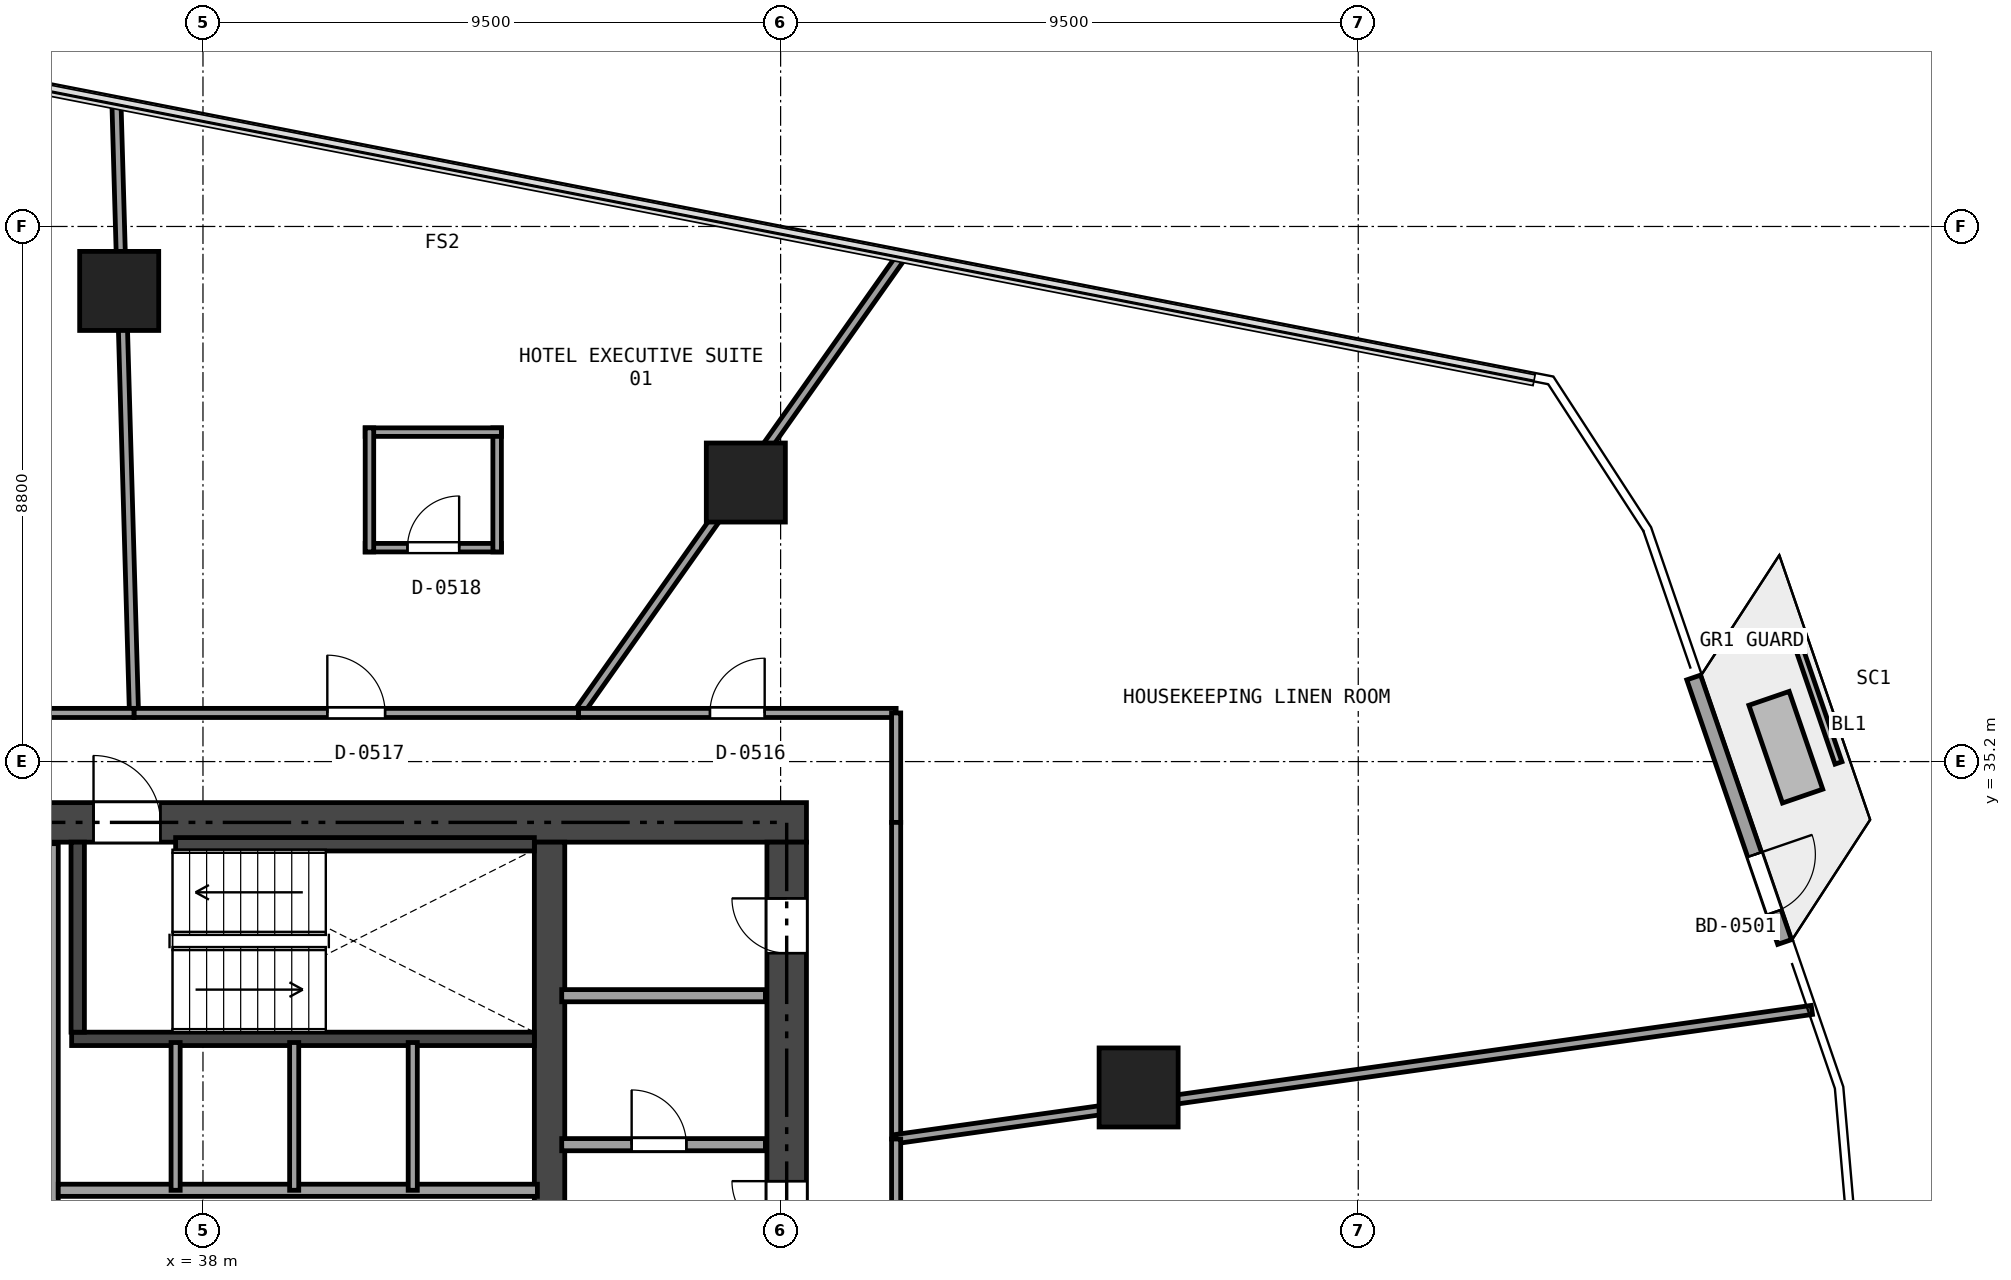
"""IFC4 building model, lengths in metres.
Left out: names, types, materials, properties, quantities, classifications, styles, units other than length and angle.
Written with IfcOpenShell. Run it as: python <this file> out.ifc"""

import sys

from ifc_helpers import new_model, si_unit, direction, frame, frame_2d, origin, origin_2d, place, context, subcontext, project, spatial, rectangle, extrude, element, fill, save


model = new_model("IFC4")
c1 = context("Model", 3, precision=1e-05, world=origin(), true_north=direction((0.0, 1.0)))
c2 = subcontext(c1, "Body", "Model", "MODEL_VIEW")
j1 = project(units=[si_unit("LENGTHUNIT", "METRE"), si_unit("PLANEANGLEUNIT", "RADIAN")], contexts=[c1])
p1 = place(None, origin())
s1 = spatial("IfcSite", under=j1, at=p1, CompositionType="ELEMENT")
p2 = place(p1, origin())
s2 = spatial("IfcBuilding", under=s1, at=p2, CompositionType="ELEMENT")
p3 = place(p2, frame((0.0, 0.0, 27.0)))
s3 = spatial("IfcBuildingStorey", under=s2, at=p3, CompositionType="ELEMENT", Elevation=27.0)
p4 = place(p3, frame((26.475, 34.2, 0.0), z_axis=(0.0, 0.0, 1.0), x_axis=(1.0, 0.0, 0.0)))
e1 = element("IfcWall", 1, at=p4, inside=s3, PredefinedType="SHEAR", context=c2, shape_type="SweptSolid", body=[
    extrude(rectangle(XDim=21.45, YDim=0.65, at=frame_2d((10.725, 0.0))), origin(), (0.0, 0.0, 1.0), 3.17),
])
p5 = place(p4, frame((9.725, 0.0, 0.0)))
e2 = element("IfcOpeningElement", 2, at=p5, cuts=e1, PredefinedType="OPENING", context=c2, shape_type="SweptSolid", body=[
    extrude(rectangle(XDim=1.1, YDim=2.15, at=frame_2d((0.55, 1.075))), frame((0.0, 0.335, 0.0), z_axis=(0.0, -1.0, 0.0), x_axis=(1.0, 0.0, 0.0)), (0.0, 0.0, 1.0), 0.67),
])
p6 = place(p4, frame((1.975, 0.0, 0.0)))
e3 = element("IfcOpeningElement", 3, at=p6, cuts=e1, PredefinedType="OPENING", context=c2, shape_type="SweptSolid", body=[
    extrude(rectangle(XDim=0.9, YDim=2.1, at=frame_2d((0.45, 1.05))), frame((0.0, 0.335, 0.0), z_axis=(0.0, -1.0, 0.0), x_axis=(1.0, 0.0, 0.0)), (0.0, 0.0, 1.0), 0.67),
])
p7 = place(p4, frame((6.275, 0.0, 0.0)))
e4 = element("IfcOpeningElement", 4, at=p7, cuts=e1, PredefinedType="OPENING", context=c2, shape_type="SweptSolid", body=[
    extrude(rectangle(XDim=0.9, YDim=2.1, at=frame_2d((0.45, 1.05))), frame((0.0, 0.335, 0.0), z_axis=(0.0, -1.0, 0.0), x_axis=(1.0, 0.0, 0.0)), (0.0, 0.0, 1.0), 0.67),
])
p8 = place(p3, frame((47.6, 18.925, 0.0), z_axis=(0.0, 0.0, 1.0), x_axis=(0.0, 1.0, 0.0)))
e5 = element("IfcWall", 5, at=p8, inside=s3, PredefinedType="SHEAR", context=c2, shape_type="SweptSolid", body=[
    extrude(rectangle(XDim=14.95, YDim=0.65, at=frame_2d((7.475, 0.0))), origin(), (0.0, 0.0, 1.0), 3.17),
])
p9 = place(p8, frame((6.575, 0.0, 0.0)))
e6 = element("IfcOpeningElement", 6, at=p9, cuts=e5, PredefinedType="OPENING", context=c2, shape_type="SweptSolid", body=[
    extrude(rectangle(XDim=1.1, YDim=2.15, at=frame_2d((0.55, 1.075))), frame((0.0, 0.335, 0.0), z_axis=(0.0, -1.0, 0.0), x_axis=(1.0, 0.0, 0.0)), (0.0, 0.0, 1.0), 0.67),
])
p10 = place(p8, frame((8.475, 0.0, 0.0)))
e7 = element("IfcOpeningElement", 7, at=p10, cuts=e5, PredefinedType="OPENING", context=c2, shape_type="SweptSolid", body=[
    extrude(rectangle(XDim=0.9, YDim=2.1, at=frame_2d((0.45, 1.05))), frame((0.0, 0.335, 0.0), z_axis=(0.0, -1.0, 0.0), x_axis=(1.0, 0.0, 0.0)), (0.0, 0.0, 1.0), 0.67),
])
p11 = place(p8, frame((13.125, 0.0, 0.0)))
e8 = element("IfcOpeningElement", 8, at=p11, cuts=e5, PredefinedType="OPENING", context=c2, shape_type="SweptSolid", body=[
    extrude(rectangle(XDim=0.9, YDim=2.1, at=frame_2d((0.45, 1.05))), frame((0.0, 0.335, 0.0), z_axis=(0.0, -1.0, 0.0), x_axis=(1.0, 0.0, 0.0)), (0.0, 0.0, 1.0), 0.67),
])
p12 = place(p3, frame((43.7, 18.925, 0.0), z_axis=(0.0, 0.0, 1.0), x_axis=(0.0, 1.0, 0.0)))
e9 = element("IfcWall", 9, at=p12, inside=s3, PredefinedType="SHEAR", context=c2, shape_type="SweptSolid", body=[
    extrude(rectangle(XDim=14.95, YDim=0.5, at=frame_2d((7.475, 0.0))), origin(), (0.0, 0.0, 1.0), 3.17),
])
p13 = place(p12, frame((8.075, 0.0, 0.0)))
e10 = element("IfcOpeningElement", 10, at=p13, cuts=e9, PredefinedType="OPENING", context=c2, shape_type="SweptSolid", body=[
    extrude(rectangle(XDim=0.9, YDim=2.1, at=frame_2d((0.45, 1.05))), frame((0.0, 0.26, 0.0), z_axis=(0.0, -1.0, 0.0), x_axis=(1.0, 0.0, 0.0)), (0.0, 0.0, 1.0), 0.52),
])
p14 = place(p3, frame((35.84, 30.64, 0.0), z_axis=(0.0, 0.0, 1.0), x_axis=(1.0, 0.0, 0.0)))
e11 = element("IfcWall", 11, at=p14, inside=s3, PredefinedType="SHEAR", context=c2, shape_type="SweptSolid", body=[
    extrude(rectangle(XDim=7.61, YDim=0.22, at=frame_2d((3.805, 0.0))), origin(), (0.0, 0.0, 1.0), 3.17),
])
p15 = place(p3, frame((35.94, 30.75, 0.0), z_axis=(0.0, 0.0, 1.0), x_axis=(0.0, 1.0, 0.0)))
e12 = element("IfcWall", 12, at=p15, inside=s3, PredefinedType="SHEAR", context=c2, shape_type="SweptSolid", body=[
    extrude(rectangle(XDim=3.125, YDim=0.22, at=frame_2d((1.562, 0.0))), origin(), (0.0, 0.0, 1.0), 3.17),
])
p16 = place(p3, frame((37.55, 33.84, 0.0), z_axis=(0.0, 0.0, 1.0), x_axis=(1.0, 0.0, 0.0)))
e13 = element("IfcWall", 13, at=p16, inside=s3, PredefinedType="SHEAR", context=c2, shape_type="SweptSolid", body=[
    extrude(rectangle(XDim=5.9, YDim=0.22, at=frame_2d((2.95, 0.0))), origin(), (0.0, 0.0, 1.0), 3.17),
])
for number, where, z_axis, x_axis in (
    (14, (53.388, 29.841, -0.405), (0.0, 0.0, 1.0), (1.0, 0.0, 0.0)),
    (15, (46.928, 39.789, -0.405), (0.0, 0.0, 1.0), (1.0, 0.0, 0.0)),
    (16, (36.622, 42.94, -0.405), (0.0, 0.0, 1.0), (1.0, 0.0, 0.0)),
):
    element("IfcColumn", number, at=place(p3, frame(where, z_axis=z_axis, x_axis=x_axis)), inside=s3, PredefinedType="COLUMN", context=c2, shape_type="SweptSolid", body=[
        extrude(rectangle(XDim=1.3, YDim=1.3, at=origin_2d()), origin(), (0.0, 0.0, 1.0), 3.575),
    ])
p17 = place(p3, frame((62.517, 36.583, 0.0), z_axis=(0.0, 0.0, 1.0), x_axis=(0.3249877985, -0.945718208996, 0.0)))
e17 = element("IfcWall", 17, at=p17, inside=s3, PredefinedType="SOLIDWALL", context=c2, shape_type="SweptSolid", body=[
    extrude(rectangle(XDim=4.6, YDim=0.24, at=frame_2d((2.3, 0.0))), origin(), (0.0, 0.0, 1.0), 3.17),
])
p18 = place(p17, frame((3.08, 0.0, 0.0)))
e18 = element("IfcOpeningElement", 18, at=p18, cuts=e17, PredefinedType="OPENING", context=c2, shape_type="SweptSolid", body=[
    extrude(rectangle(XDim=1.0, YDim=2.15, at=frame_2d((0.5, 1.075))), frame((0.0, 0.13, 0.0), z_axis=(0.0, -1.0, 0.0), x_axis=(1.0, 0.0, 0.0)), (0.0, 0.0, 1.0), 0.26),
])
p19 = place(p3, frame((43.9, 28.9, 0.0), z_axis=(0.0, 0.0, 1.0), x_axis=(1.0, 0.0, 0.0)))
e19 = element("IfcWall", 19, at=p19, inside=s3, PredefinedType="SOLIDWALL", context=c2, shape_type="SweptSolid", body=[
    extrude(rectangle(XDim=3.35, YDim=0.2, at=frame_2d((1.675, 0.0))), origin(), (0.0, 0.0, 1.0), 3.17),
])
p20 = place(p19, frame((1.15, 0.0, 0.0)))
e20 = element("IfcOpeningElement", 20, at=p20, cuts=e19, PredefinedType="OPENING", context=c2, shape_type="SweptSolid", body=[
    extrude(rectangle(XDim=0.9, YDim=2.1, at=frame_2d((0.45, 1.05))), frame((0.0, 0.11, 0.0), z_axis=(0.0, -1.0, 0.0), x_axis=(1.0, 0.0, 0.0)), (0.0, 0.0, 1.0), 0.22),
])
p21 = place(p3, frame((43.9, 31.35, 0.0), z_axis=(0.0, 0.0, 1.0), x_axis=(1.0, 0.0, 0.0)))
e21 = element("IfcWall", 21, at=p21, inside=s3, PredefinedType="SOLIDWALL", context=c2, shape_type="SweptSolid", body=[
    extrude(rectangle(XDim=3.35, YDim=0.2, at=frame_2d((1.675, 0.0))), origin(), (0.0, 0.0, 1.0), 3.17),
])
p22 = place(p3, frame((35.52, 18.95, 0.0), z_axis=(0.0, 0.0, 1.0), x_axis=(0.0, 1.0, 0.0)))
e22 = element("IfcWall", 22, at=p22, inside=s3, PredefinedType="SOLIDWALL", context=c2, shape_type="SweptSolid", body=[
    extrude(rectangle(XDim=14.9, YDim=0.2, at=frame_2d((7.45, 0.0))), origin(), (0.0, 0.0, 1.0), 2.691),
])
p23 = place(p22, frame((7.755, 0.0, 0.0)))
e23 = element("IfcOpeningElement", 23, at=p23, cuts=e22, PredefinedType="OPENING", context=c2, shape_type="SweptSolid", body=[
    extrude(rectangle(XDim=0.95, YDim=2.15, at=frame_2d((0.475, 1.075))), frame((0.0, 0.11, 0.0), z_axis=(0.0, -1.0, 0.0), x_axis=(1.0, 0.0, 0.0)), (0.0, 0.0, 1.0), 0.22),
])
p24 = place(p22, frame((0.6, 0.0, 0.0)))
e24 = element("IfcOpeningElement", 24, at=p24, cuts=e22, PredefinedType="OPENING", context=c2, shape_type="SweptSolid", body=[
    extrude(rectangle(XDim=0.9, YDim=2.1, at=frame_2d((0.45, 1.05))), frame((0.0, 0.11, 0.0), z_axis=(0.0, -1.0, 0.0), x_axis=(1.0, 0.0, 0.0)), (0.0, 0.0, 1.0), 0.22),
])
p25 = place(p3, frame((35.62, 28.15, 0.0), z_axis=(0.0, 0.0, 1.0), x_axis=(1.0, 0.0, 0.0)))
e25 = element("IfcWall", 25, at=p25, inside=s3, PredefinedType="SOLIDWALL", context=c2, shape_type="SweptSolid", body=[
    extrude(rectangle(XDim=7.88, YDim=0.2, at=frame_2d((3.94, 0.0))), origin(), (0.0, 0.0, 1.0), 3.17),
])
for number, where, z_axis, x_axis in (
    (26, (37.55, 28.15, 0.0), (0.0, 0.0, 1.0), (0.0, 1.0, 0.0)),
    (27, (39.5, 28.15, 0.0), (0.0, 0.0, 1.0), (0.0, 1.0, 0.0)),
    (28, (41.45, 28.15, 0.0), (0.0, 0.0, 1.0), (0.0, 1.0, 0.0)),
):
    element("IfcWall", number, at=place(p3, frame(where, z_axis=z_axis, x_axis=x_axis)), inside=s3, PredefinedType="PARTITIONING", context=c2, shape_type="SweptSolid", body=[
        extrude(rectangle(XDim=2.43, YDim=0.15, at=frame_2d((1.215, 0.0))), origin(), (0.0, 0.0, 1.0), 3.17),
    ])
p26 = place(p3, frame((40.668, 38.718, 0.0), z_axis=(0.0, 0.0, 1.0), x_axis=(1.0, 0.0, 0.0)))
e29 = element("IfcWall", 29, at=p26, inside=s3, PredefinedType="PARTITIONING", context=c2, shape_type="SweptSolid", body=[
    extrude(rectangle(XDim=2.24, YDim=0.14, at=frame_2d((1.12, 0.0))), origin(), (0.0, 0.0, 1.0), 3.17),
])
p27 = place(p26, frame((0.695, 0.0, 0.0)))
e30 = element("IfcOpeningElement", 30, at=p27, cuts=e29, PredefinedType="OPENING", context=c2, shape_type="SweptSolid", body=[
    extrude(rectangle(XDim=0.85, YDim=2.1, at=frame_2d((0.425, 1.05))), frame((0.0, 0.08, 0.0), z_axis=(0.0, -1.0, 0.0), x_axis=(1.0, 0.0, 0.0)), (0.0, 0.0, 1.0), 0.16),
])
p28 = place(p3, frame((42.838, 38.648, 0.0), z_axis=(0.0, 0.0, 1.0), x_axis=(0.0, 1.0, 0.0)))
e31 = element("IfcWall", 31, at=p28, inside=s3, PredefinedType="PARTITIONING", context=c2, shape_type="SweptSolid", body=[
    extrude(rectangle(XDim=2.04, YDim=0.14, at=frame_2d((1.02, 0.0))), origin(), (0.0, 0.0, 1.0), 2.747),
])
p29 = place(p3, frame((42.908, 40.618, 0.0), z_axis=(0.0, 0.0, 1.0), x_axis=(-1.0, 0.0, 0.0)))
e32 = element("IfcWall", 32, at=p29, inside=s3, PredefinedType="PARTITIONING", context=c2, shape_type="SweptSolid", body=[
    extrude(rectangle(XDim=2.24, YDim=0.14, at=frame_2d((1.12, 0.0))), origin(), (0.0, 0.0, 1.0), 3.17),
])
p30 = place(p3, frame((40.738, 40.688, 0.0), z_axis=(0.0, 0.0, 1.0), x_axis=(0.0, -1.0, 0.0)))
e33 = element("IfcWall", 33, at=p30, inside=s3, PredefinedType="PARTITIONING", context=c2, shape_type="SweptSolid", body=[
    extrude(rectangle(XDim=2.04, YDim=0.14, at=frame_2d((1.02, 0.0))), origin(), (0.0, 0.0, 1.0), 2.747),
])
p31 = place(p3, frame((49.511, 43.545, 0.0), z_axis=(0.0, 0.0, 1.0), x_axis=(-0.577413180471, -0.816452092298, 0.0)))
e34 = element("IfcWall", 34, at=p31, inside=s3, PredefinedType="PARTITIONING", context=c2, shape_type="SweptSolid", body=[
    extrude(rectangle(XDim=9.241, YDim=0.15, at=frame_2d((4.621, 0.0))), origin(), (0.0, 0.0, 1.0), 2.395),
])
p32 = place(p3, frame((44.175, 36.0, 0.0), z_axis=(0.0, 0.0, 1.0), x_axis=(1.0, 0.0, 0.0)))
e35 = element("IfcWall", 35, at=p32, inside=s3, PredefinedType="PARTITIONING", context=c2, shape_type="SweptSolid", body=[
    extrude(rectangle(XDim=5.225, YDim=0.15, at=frame_2d((2.612, 0.0))), origin(), (0.0, 0.0, 1.0), 2.355),
])
p33 = place(p32, frame((2.163, 0.0, 0.0)))
e36 = element("IfcOpeningElement", 36, at=p33, cuts=e35, PredefinedType="OPENING", context=c2, shape_type="SweptSolid", body=[
    extrude(rectangle(XDim=0.9, YDim=2.0, at=frame_2d((0.45, 1.0))), frame((0.0, 0.085, 0.0), z_axis=(0.0, -1.0, 0.0), x_axis=(1.0, 0.0, 0.0)), (0.0, 0.0, 1.0), 0.17),
])
p34 = place(p3, frame((49.4, 36.0, 0.0), z_axis=(0.0, 0.0, 1.0), x_axis=(0.0, -1.0, 0.0)))
e37 = element("IfcWall", 37, at=p34, inside=s3, PredefinedType="PARTITIONING", context=c2, shape_type="SweptSolid", body=[
    extrude(rectangle(XDim=1.8, YDim=0.15, at=frame_2d((0.9, 0.0))), origin(), (0.0, 0.0, 1.0), 2.355),
])
p35 = place(p3, frame((49.4, 34.2, 0.0), z_axis=(0.0, 0.0, 1.0), x_axis=(0.0, -1.0, 0.0)))
e38 = element("IfcWall", 38, at=p35, inside=s3, PredefinedType="PARTITIONING", context=c2, shape_type="SweptSolid", body=[
    extrude(rectangle(XDim=5.207, YDim=0.15, at=frame_2d((2.604, 0.0))), origin(), (0.0, 0.0, 1.0), 2.395),
])
p36 = place(p3, frame((49.4, 28.993, 0.0), z_axis=(0.0, 0.0, 1.0), x_axis=(0.990209136723, 0.139591781813, 0.0)))
e39 = element("IfcWall", 39, at=p36, inside=s3, PredefinedType="PARTITIONING", context=c2, shape_type="SweptSolid", body=[
    extrude(rectangle(XDim=15.209, YDim=0.15, at=frame_2d((7.604, 0.0))), origin(), (0.0, 0.0, 1.0), 2.395),
])
p37 = place(p3, frame((36.576, 46.063, 0.0), z_axis=(0.0, 0.0, 1.0), x_axis=(0.028713470257, -0.99958768331, 0.0)))
e40 = element("IfcWall", 40, at=p37, inside=s3, PredefinedType="PARTITIONING", context=c2, shape_type="SweptSolid", body=[
    extrude(rectangle(XDim=10.067, YDim=0.15, at=frame_2d((5.034, 0.0))), origin(), (0.0, 0.0, 1.0), 2.395),
])
p38 = place(p3, frame((36.865, 36.0, 0.0), z_axis=(0.0, 0.0, 1.0), x_axis=(1.0, 0.0, 0.0)))
e41 = element("IfcWall", 41, at=p38, inside=s3, PredefinedType="PARTITIONING", context=c2, shape_type="SweptSolid", body=[
    extrude(rectangle(XDim=7.31, YDim=0.15, at=frame_2d((3.655, 0.0))), origin(), (0.0, 0.0, 1.0), 2.395),
])
p39 = place(p38, frame((3.18, 0.0, 0.0)))
e42 = element("IfcOpeningElement", 42, at=p39, cuts=e41, PredefinedType="OPENING", context=c2, shape_type="SweptSolid", body=[
    extrude(rectangle(XDim=0.95, YDim=2.15, at=frame_2d((0.475, 1.075))), frame((0.0, 0.085, 0.0), z_axis=(0.0, -1.0, 0.0), x_axis=(1.0, 0.0, 0.0)), (0.0, 0.0, 1.0), 0.17),
])
p40 = place(p3, frame((29.7, 36.0, 0.0), z_axis=(0.0, 0.0, 1.0), x_axis=(1.0, 0.0, 0.0)))
e43 = element("IfcWall", 43, at=p40, inside=s3, PredefinedType="PARTITIONING", context=c2, shape_type="SweptSolid", body=[
    extrude(rectangle(XDim=7.165, YDim=0.15, at=frame_2d((3.583, 0.0))), origin(), (0.0, 0.0, 1.0), 2.395),
])
p41 = place(p40, frame((3.108, 0.0, 0.0)))
e44 = element("IfcOpeningElement", 44, at=p41, cuts=e43, PredefinedType="OPENING", context=c2, shape_type="SweptSolid", body=[
    extrude(rectangle(XDim=0.95, YDim=2.15, at=frame_2d((0.475, 1.075))), frame((0.0, 0.085, 0.0), z_axis=(0.0, -1.0, 0.0), x_axis=(1.0, 0.0, 0.0)), (0.0, 0.0, 1.0), 0.17),
])
p42 = place(p3, frame((49.4, 28.993, 0.0), z_axis=(0.0, 0.0, 1.0), x_axis=(0.0, -1.0, 0.0)))
e45 = element("IfcWall", 45, at=p42, inside=s3, PredefinedType="PARTITIONING", context=c2, shape_type="SweptSolid", body=[
    extrude(rectangle(XDim=7.033, YDim=0.15, at=frame_2d((3.517, 0.0))), origin(), (0.0, 0.0, 1.0), 2.395),
])
p43 = place(p42, frame((3.041, 0.0, 0.0)))
e46 = element("IfcOpeningElement", 46, at=p43, cuts=e45, PredefinedType="OPENING", context=c2, shape_type="SweptSolid", body=[
    extrude(rectangle(XDim=0.95, YDim=2.15, at=frame_2d((0.475, 1.075))), frame((0.0, 0.085, 0.0), z_axis=(0.0, -1.0, 0.0), x_axis=(1.0, 0.0, 0.0)), (0.0, 0.0, 1.0), 0.17),
])
p44 = place(p18, origin())
e47 = element("IfcDoor", 47, at=p44, inside=s3, OperationType="SINGLE_SWING_LEFT", PredefinedType="DOOR", context=c2, shape_type="SweptSolid", body=[
    extrude(rectangle(XDim=1.0, YDim=2.15, at=frame_2d((0.5, 1.075))), frame((0.0, 0.025, 0.0), z_axis=(0.0, -1.0, 0.0), x_axis=(1.0, 0.0, 0.0)), (0.0, 0.0, 1.0), 0.05),
])
fill(e18, e47)
p45 = place(p5, origin())
e48 = element("IfcDoor", 48, at=p45, inside=s3, OperationType="SINGLE_SWING_LEFT", PredefinedType="DOOR", context=c2, shape_type="SweptSolid", body=[
    extrude(rectangle(XDim=1.1, YDim=2.15, at=frame_2d((0.55, 1.075))), frame((0.0, 0.025, 0.0), z_axis=(0.0, -1.0, 0.0), x_axis=(1.0, 0.0, 0.0)), (0.0, 0.0, 1.0), 0.05),
])
fill(e2, e48)
p46 = place(p10, origin())
e49 = element("IfcDoor", 49, at=p46, inside=s3, OperationType="SINGLE_SWING_RIGHT", PredefinedType="DOOR", context=c2, shape_type="SweptSolid", body=[
    extrude(rectangle(XDim=0.9, YDim=2.1, at=frame_2d((0.45, 1.05))), frame((0.0, 0.025, 0.0), z_axis=(0.0, -1.0, 0.0), x_axis=(1.0, 0.0, 0.0)), (0.0, 0.0, 1.0), 0.05),
])
fill(e7, e49)
p47 = place(p20, origin())
e50 = element("IfcDoor", 50, at=p47, inside=s3, OperationType="SINGLE_SWING_LEFT", PredefinedType="DOOR", context=c2, shape_type="SweptSolid", body=[
    extrude(rectangle(XDim=0.9, YDim=2.1, at=frame_2d((0.45, 1.05))), frame((0.0, 0.025, 0.0), z_axis=(0.0, -1.0, 0.0), x_axis=(1.0, 0.0, 0.0)), (0.0, 0.0, 1.0), 0.05),
])
fill(e20, e50)
p48 = place(p11, origin())
e51 = element("IfcDoor", 51, at=p48, inside=s3, OperationType="SINGLE_SWING_RIGHT", PredefinedType="DOOR", context=c2, shape_type="SweptSolid", body=[
    extrude(rectangle(XDim=0.9, YDim=2.1, at=frame_2d((0.45, 1.05))), frame((0.0, 0.025, 0.0), z_axis=(0.0, -1.0, 0.0), x_axis=(1.0, 0.0, 0.0)), (0.0, 0.0, 1.0), 0.05),
])
fill(e8, e51)
p49 = place(p33, origin())
e52 = element("IfcDoor", 52, at=p49, inside=s3, OperationType="SINGLE_SWING_RIGHT", PredefinedType="DOOR", context=c2, shape_type="SweptSolid", body=[
    extrude(rectangle(XDim=0.9, YDim=2.0, at=frame_2d((0.45, 1.0))), frame((0.0, 0.025, 0.0), z_axis=(0.0, -1.0, 0.0), x_axis=(1.0, 0.0, 0.0)), (0.0, 0.0, 1.0), 0.05),
])
fill(e36, e52)
p50 = place(p39, origin())
e53 = element("IfcDoor", 53, at=p50, inside=s3, OperationType="SINGLE_SWING_LEFT", PredefinedType="DOOR", context=c2, shape_type="SweptSolid", body=[
    extrude(rectangle(XDim=0.95, YDim=2.15, at=frame_2d((0.475, 1.075))), frame((0.0, 0.025, 0.0), z_axis=(0.0, -1.0, 0.0), x_axis=(1.0, 0.0, 0.0)), (0.0, 0.0, 1.0), 0.05),
])
fill(e42, e53)
p51 = place(p27, origin())
e54 = element("IfcDoor", 54, at=p51, inside=s3, OperationType="SINGLE_SWING_RIGHT", PredefinedType="DOOR", context=c2, shape_type="SweptSolid", body=[
    extrude(rectangle(XDim=0.85, YDim=2.1, at=frame_2d((0.425, 1.05))), frame((0.0, 0.025, 0.0), z_axis=(0.0, -1.0, 0.0), x_axis=(1.0, 0.0, 0.0)), (0.0, 0.0, 1.0), 0.05),
])
fill(e30, e54)
save(model, sys.argv[1])
